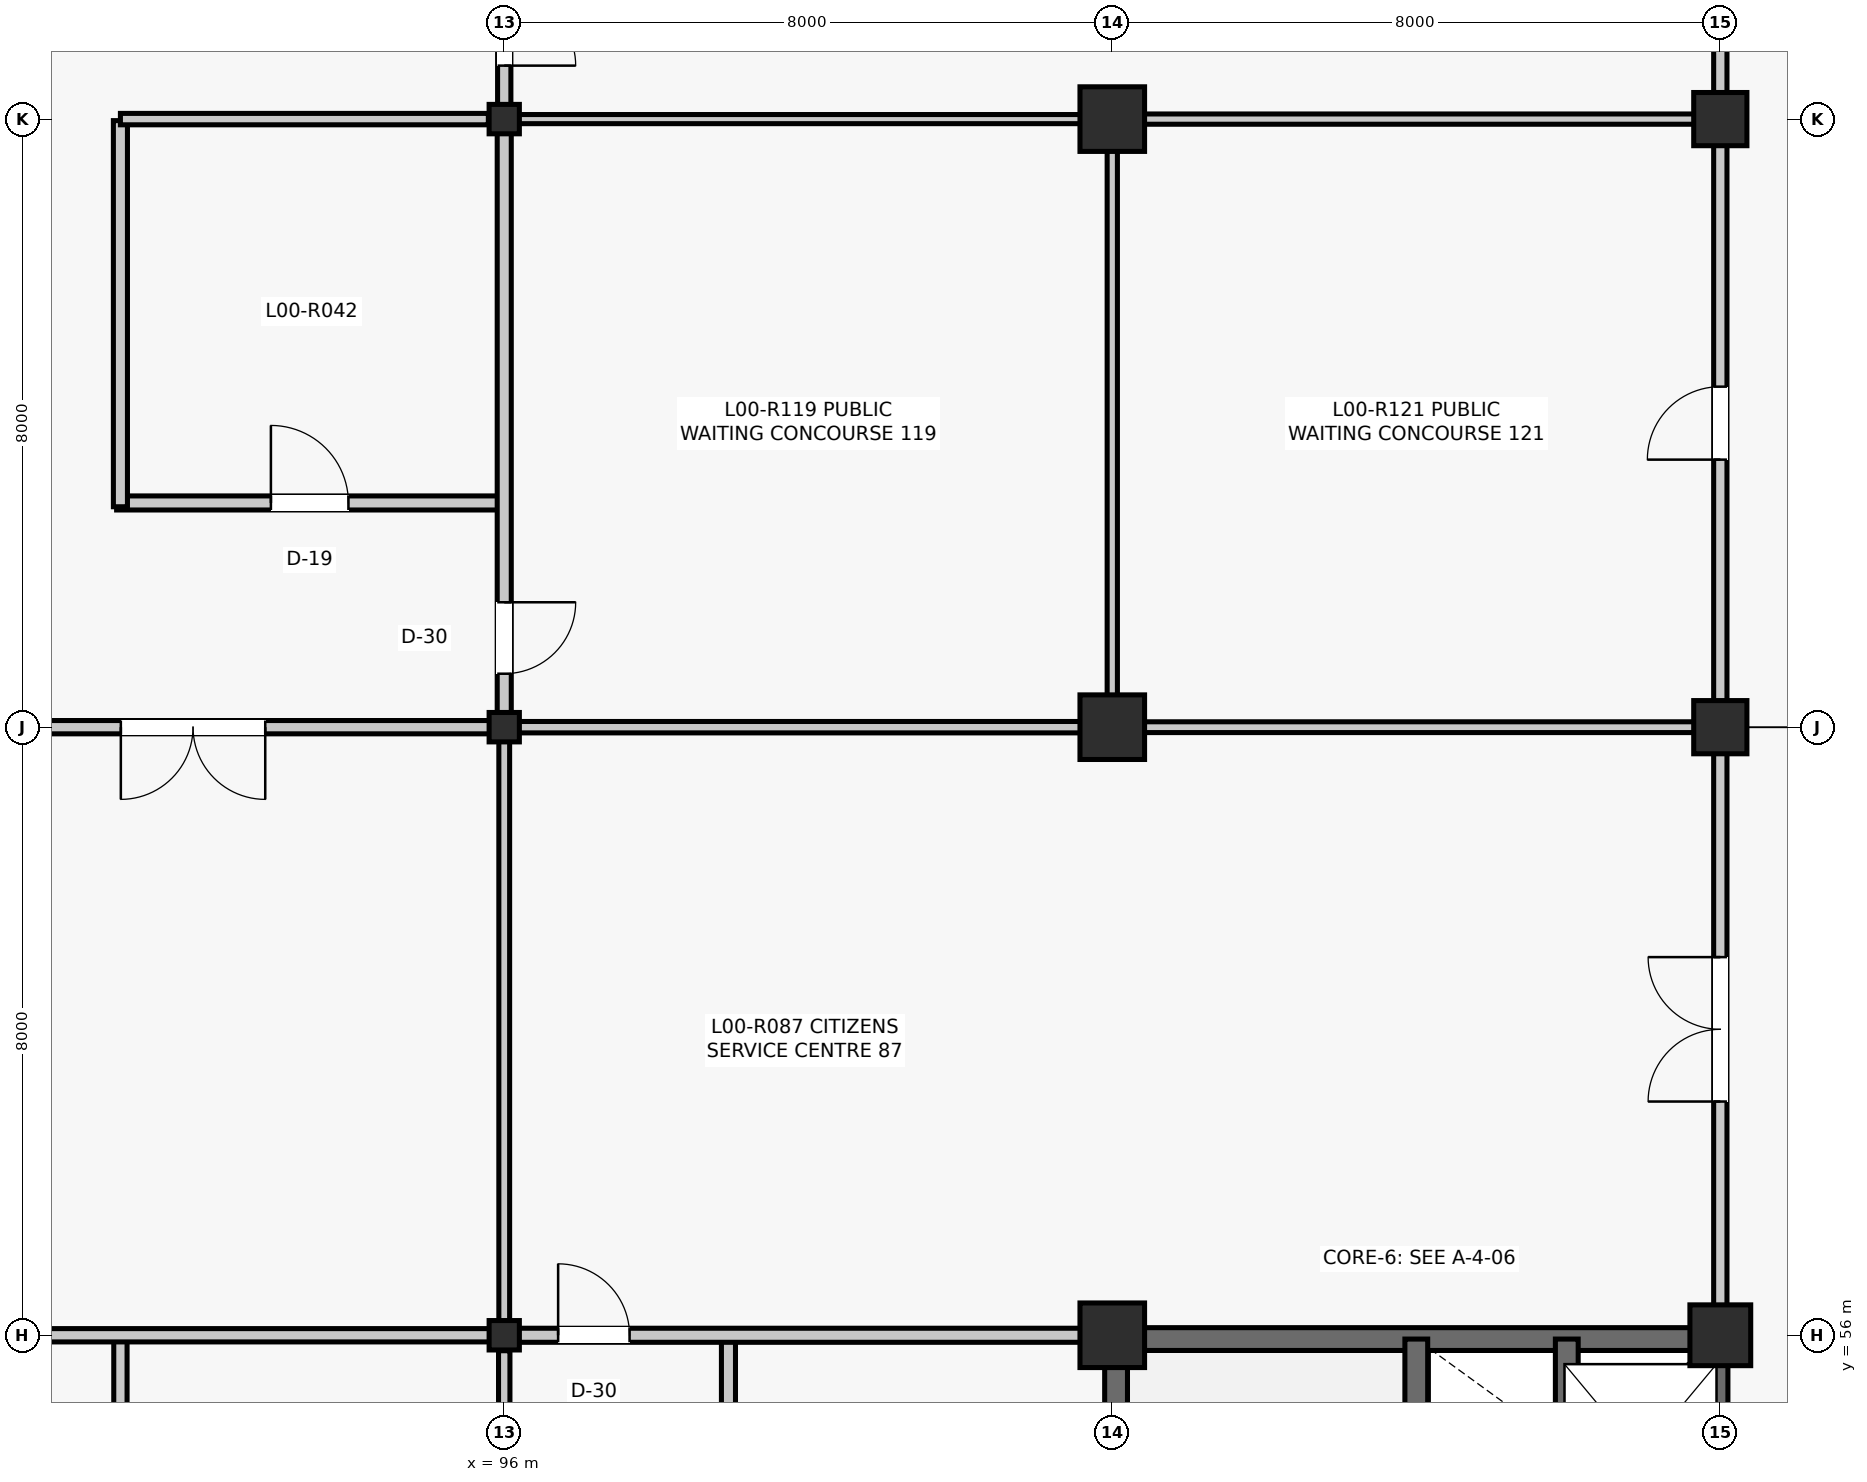
"""IFC4 building model, lengths in metres.
Left out: names, types, materials, properties, quantities, classifications, styles, units other than length and angle.
Written with IfcOpenShell. Run it as: python <this file> out.ifc"""

import sys

from ifc_helpers import new_model, si_unit, direction, frame, frame_2d, origin, origin_2d, place, context, subcontext, project, spatial, rectangle, i_section, extrude, element, fill, save


model = new_model("IFC4")
c1 = context("Model", 3, precision=1e-05, world=origin(), true_north=direction((0.0, 1.0)))
c2 = subcontext(c1, "Body", "Model", "MODEL_VIEW")
j1 = project(units=[si_unit("LENGTHUNIT", "METRE"), si_unit("PLANEANGLEUNIT", "RADIAN")], contexts=[c1])
p1 = place(None, origin())
s1 = spatial("IfcSite", under=j1, at=p1, CompositionType="ELEMENT")
p2 = place(p1, origin())
s2 = spatial("IfcBuilding", under=s1, at=p2, CompositionType="ELEMENT")
p3 = place(p2, origin())
s3 = spatial("IfcBuildingStorey", under=s2, at=p3, CompositionType="ELEMENT", Elevation=0.0)
for number, where, z_axis, x_axis in (
    (1, (96.0, 56.0, 0.0), (0.0, 0.0, 1.0), (1.0, 0.0, 0.0)),
    (2, (96.0, 64.0, 0.0), (0.0, 0.0, 1.0), (1.0, 0.0, 0.0)),
    (3, (96.0, 72.0, 0.0), (0.0, 0.0, 1.0), (1.0, 0.0, 0.0)),
):
    element("IfcColumn", number, at=place(p3, frame(where, z_axis=z_axis, x_axis=x_axis)), inside=s3, PredefinedType="COLUMN", context=c2, shape_type="SweptSolid", body=[
        extrude(i_section(OverallWidth=0.398, OverallDepth=0.387, WebThickness=0.021, FlangeThickness=0.033, FilletRadius=0.015, at=origin_2d()), origin(), (0.0, 0.0, 1.0), 5.28),
    ])
for number, where, z_axis, x_axis in (
    (4, (104.0, 56.0, 0.0), (0.0, 0.0, 1.0), (1.0, 0.0, 0.0)),
    (5, (104.0, 64.0, 0.0), (0.0, 0.0, 1.0), (1.0, 0.0, 0.0)),
    (6, (104.0, 72.0, 0.0), (0.0, 0.0, 1.0), (1.0, 0.0, 0.0)),
):
    element("IfcColumn", number, at=place(p3, frame(where, z_axis=z_axis, x_axis=x_axis)), inside=s3, PredefinedType="COLUMN", context=c2, shape_type="SweptSolid", body=[
        extrude(rectangle(XDim=0.85, YDim=0.85, at=origin_2d()), origin(), (0.0, 0.0, 1.0), 5.28),
    ])
p4 = place(p3, frame((112.0, 56.0, 0.0), z_axis=(0.0, 0.0, 1.0), x_axis=(1.0, 0.0, 0.0)))
e7 = element("IfcColumn", 7, at=p4, inside=s3, PredefinedType="COLUMN", context=c2, shape_type="SweptSolid", body=[
    extrude(rectangle(XDim=0.8, YDim=0.8, at=origin_2d()), origin(), (0.0, 0.0, 1.0), 5.28),
])
for number, where, z_axis, x_axis in (
    (8, (112.0, 64.0, 0.0), (0.0, 0.0, 1.0), (1.0, 0.0, 0.0)),
    (9, (112.0, 72.0, 0.0), (0.0, 0.0, 1.0), (1.0, 0.0, 0.0)),
):
    element("IfcColumn", number, at=place(p3, frame(where, z_axis=z_axis, x_axis=x_axis)), inside=s3, PredefinedType="COLUMN", context=c2, shape_type="SweptSolid", body=[
        extrude(rectangle(XDim=0.7, YDim=0.7, at=origin_2d()), origin(), (0.0, 0.0, 1.0), 5.28),
    ])
p5 = place(p3, frame((104.05, 48.315, 0.0), z_axis=(0.0, 0.0, 1.0), x_axis=(0.0, 1.0, 0.0)))
e10 = element("IfcWall", 10, at=p5, inside=s3, PredefinedType="SHEAR", context=c2, shape_type="SweptSolid", body=[
    extrude(rectangle(XDim=7.37, YDim=0.3, at=frame_2d((3.685, 0.0))), origin(), (0.0, 0.0, 1.0), 5.035),
])
p6 = place(p3, frame((104.315, 55.95, 0.0), z_axis=(0.0, 0.0, 1.0), x_axis=(1.0, 0.0, 0.0)))
e11 = element("IfcWall", 11, at=p6, inside=s3, PredefinedType="SHEAR", context=c2, shape_type="SweptSolid", body=[
    extrude(rectangle(XDim=7.395, YDim=0.3, at=frame_2d((3.698, 0.0))), origin(), (0.0, 0.0, 1.0), 5.035),
])
p7 = place(p3, frame((111.95, 48.29, 0.0), z_axis=(0.0, 0.0, 1.0), x_axis=(0.0, 1.0, 0.0)))
e12 = element("IfcWall", 12, at=p7, inside=s3, PredefinedType="SHEAR", context=c2, shape_type="SweptSolid", body=[
    extrude(rectangle(XDim=7.42, YDim=0.3, at=frame_2d((3.71, 0.0))), origin(), (0.0, 0.0, 1.0), 5.035),
])
p8 = place(p3, frame((108.0, 48.05, 0.0), z_axis=(0.0, 0.0, 1.0), x_axis=(0.0, 1.0, 0.0)))
e13 = element("IfcWall", 13, at=p8, inside=s3, PredefinedType="SHEAR", context=c2, shape_type="SweptSolid", body=[
    extrude(rectangle(XDim=7.9, YDim=0.3, at=frame_2d((3.95, 0.0))), origin(), (0.0, 0.0, 1.0), 5.035),
])
p9 = place(p8, frame((0.55, 0.0, 0.0)))
e14 = element("IfcOpeningElement", 14, at=p9, cuts=e13, PredefinedType="OPENING", context=c2, shape_type="SweptSolid", body=[
    extrude(rectangle(XDim=1.1, YDim=2.15, at=frame_2d((0.55, 1.075))), frame((0.0, 0.16, 0.0), z_axis=(0.0, -1.0, 0.0), x_axis=(1.0, 0.0, 0.0)), (0.0, 0.0, 1.0), 0.32),
])
p10 = place(p3, frame((109.98, 53.05, 0.0), z_axis=(0.0, 0.0, 1.0), x_axis=(0.0, 1.0, 0.0)))
e15 = element("IfcWall", 15, at=p10, inside=s3, PredefinedType="SHEAR", context=c2, shape_type="SweptSolid", body=[
    extrude(rectangle(XDim=2.9, YDim=0.3, at=frame_2d((1.45, 0.0))), origin(), (0.0, 0.0, 1.0), 5.035),
])
p11 = place(p3, frame((90.95, 50.9, 0.0), z_axis=(0.0, 0.0, 1.0), x_axis=(0.0, 1.0, 0.0)))
e16 = element("IfcWall", 16, at=p11, inside=s3, PredefinedType="PARTITIONING", context=c2, shape_type="SweptSolid", body=[
    extrude(rectangle(XDim=5.08, YDim=0.175, at=frame_2d((2.54, 0.0))), origin(), (0.0, 0.0, 1.0), 4.169),
])
p12 = place(p3, frame((96.0, 50.95, 0.0), z_axis=(0.0, 0.0, 1.0), x_axis=(0.0, 1.0, 0.0)))
e17 = element("IfcWall", 17, at=p12, inside=s3, PredefinedType="PARTITIONING", context=c2, shape_type="SweptSolid", body=[
    extrude(rectangle(XDim=4.846, YDim=0.15, at=frame_2d((2.423, 0.0))), origin(), (0.0, 0.0, 1.0), 4.404),
])
p13 = place(p3, frame((90.9, 66.95, 0.0), z_axis=(0.0, 0.0, 1.0), x_axis=(1.0, 0.0, 0.0)))
e18 = element("IfcWall", 18, at=p13, inside=s3, PredefinedType="PARTITIONING", context=c2, shape_type="SweptSolid", body=[
    extrude(rectangle(XDim=5.08, YDim=0.185, at=frame_2d((2.54, 0.0))), origin(), (0.0, 0.0, 1.0), 4.403),
])
p14 = place(p13, frame((2.03, 0.0, 0.0)))
e19 = element("IfcOpeningElement", 19, at=p14, cuts=e18, PredefinedType="OPENING", context=c2, shape_type="SweptSolid", body=[
    extrude(rectangle(XDim=1.02, YDim=2.2, at=frame_2d((0.51, 1.1))), frame((0.0, 0.103, 0.0), z_axis=(0.0, -1.0, 0.0), x_axis=(1.0, 0.0, 0.0)), (0.0, 0.0, 1.0), 0.205),
])
p15 = place(p3, frame((90.95, 66.9, 0.0), z_axis=(0.0, 0.0, 1.0), x_axis=(0.0, 1.0, 0.0)))
e20 = element("IfcWall", 20, at=p15, inside=s3, PredefinedType="PARTITIONING", context=c2, shape_type="SweptSolid", body=[
    extrude(rectangle(XDim=5.08, YDim=0.185, at=frame_2d((2.54, 0.0))), origin(), (0.0, 0.0, 1.0), 4.262),
])
p16 = place(p3, frame((90.95, 72.0, 0.0), z_axis=(0.0, 0.0, 1.0), x_axis=(1.0, 0.0, 0.0)))
e21 = element("IfcWall", 21, at=p16, inside=s3, PredefinedType="PARTITIONING", context=c2, shape_type="SweptSolid", body=[
    extrude(rectangle(XDim=4.841, YDim=0.15, at=frame_2d((2.42, 0.0))), origin(), (0.0, 0.0, 1.0), 4.262),
])
p17 = place(p3, frame((98.95, 50.9, 0.0), z_axis=(0.0, 0.0, 1.0), x_axis=(0.0, 1.0, 0.0)))
e22 = element("IfcWall", 22, at=p17, inside=s3, PredefinedType="PARTITIONING", context=c2, shape_type="SweptSolid", body=[
    extrude(rectangle(XDim=5.08, YDim=0.185, at=frame_2d((2.54, 0.0))), origin(), (0.0, 0.0, 1.0), 4.404),
])
p18 = place(p3, frame((88.0, 56.0, 0.0), z_axis=(0.0, 0.0, 1.0), x_axis=(1.0, 0.0, 0.0)))
e23 = element("IfcWall", 23, at=p18, inside=s3, PredefinedType="PARTITIONING", context=c2, shape_type="SweptSolid", body=[
    extrude(rectangle(XDim=7.811, YDim=0.175, at=frame_2d((3.906, 0.0))), origin(), (0.0, 0.0, 1.0), 4.169),
])
p19 = place(p18, frame((0.52, 0.0, 0.0)))
e24 = element("IfcOpeningElement", 24, at=p19, cuts=e23, PredefinedType="OPENING", context=c2, shape_type="SweptSolid", body=[
    extrude(rectangle(XDim=0.94, YDim=2.12, at=frame_2d((0.47, 1.06))), frame((0.0, 0.097, 0.0), z_axis=(0.0, -1.0, 0.0), x_axis=(1.0, 0.0, 0.0)), (0.0, 0.0, 1.0), 0.195),
])
p20 = place(p3, frame((96.0, 56.184, 0.0), z_axis=(0.0, 0.0, 1.0), x_axis=(0.0, 1.0, 0.0)))
e25 = element("IfcWall", 25, at=p20, inside=s3, PredefinedType="PARTITIONING", context=c2, shape_type="SweptSolid", body=[
    extrude(rectangle(XDim=7.633, YDim=0.142, at=frame_2d((3.816, 0.0))), origin(), (0.0, 0.0, 1.0), 4.471),
])
p21 = place(p3, frame((88.0, 64.0, 0.0), z_axis=(0.0, 0.0, 1.0), x_axis=(1.0, 0.0, 0.0)))
e26 = element("IfcWall", 26, at=p21, inside=s3, PredefinedType="PARTITIONING", context=c2, shape_type="SweptSolid", body=[
    extrude(rectangle(XDim=7.811, YDim=0.175, at=frame_2d((3.906, 0.0))), origin(), (0.0, 0.0, 1.0), 4.25),
])
p22 = place(p21, frame((2.956, 0.0, 0.0)))
e27 = element("IfcOpeningElement", 27, at=p22, cuts=e26, PredefinedType="OPENING", context=c2, shape_type="SweptSolid", body=[
    extrude(rectangle(XDim=1.9, YDim=2.38, at=frame_2d((0.95, 1.19))), frame((0.0, 0.097, 0.0), z_axis=(0.0, -1.0, 0.0), x_axis=(1.0, 0.0, 0.0)), (0.0, 0.0, 1.0), 0.195),
])
p23 = place(p3, frame((96.0, 64.184, 0.0), z_axis=(0.0, 0.0, 1.0), x_axis=(0.0, 1.0, 0.0)))
e28 = element("IfcWall", 28, at=p23, inside=s3, PredefinedType="PARTITIONING", context=c2, shape_type="SweptSolid", body=[
    extrude(rectangle(XDim=7.633, YDim=0.185, at=frame_2d((3.816, 0.0))), origin(), (0.0, 0.0, 1.0), 4.403),
])
p24 = place(p23, frame((0.52, 0.0, 0.0)))
e29 = element("IfcOpeningElement", 29, at=p24, cuts=e28, PredefinedType="OPENING", context=c2, shape_type="SweptSolid", body=[
    extrude(rectangle(XDim=0.94, YDim=2.12, at=frame_2d((0.47, 1.06))), frame((0.0, 0.103, 0.0), z_axis=(0.0, -1.0, 0.0), x_axis=(1.0, 0.0, 0.0)), (0.0, 0.0, 1.0), 0.205),
])
p25 = place(p3, frame((96.0, 72.184, 0.0), z_axis=(0.0, 0.0, 1.0), x_axis=(0.0, 1.0, 0.0)))
e30 = element("IfcWall", 30, at=p25, inside=s3, PredefinedType="PARTITIONING", context=c2, shape_type="SweptSolid", body=[
    extrude(rectangle(XDim=7.633, YDim=0.175, at=frame_2d((3.816, 0.0))), origin(), (0.0, 0.0, 1.0), 4.412),
])
p26 = place(p25, frame((0.52, 0.0, 0.0)))
e31 = element("IfcOpeningElement", 31, at=p26, cuts=e30, PredefinedType="OPENING", context=c2, shape_type="SweptSolid", body=[
    extrude(rectangle(XDim=0.94, YDim=2.12, at=frame_2d((0.47, 1.06))), frame((0.0, 0.097, 0.0), z_axis=(0.0, -1.0, 0.0), x_axis=(1.0, 0.0, 0.0)), (0.0, 0.0, 1.0), 0.195),
])
p27 = place(p3, frame((96.189, 56.0, 0.0), z_axis=(0.0, 0.0, 1.0), x_axis=(1.0, 0.0, 0.0)))
e32 = element("IfcWall", 32, at=p27, inside=s3, PredefinedType="PARTITIONING", context=c2, shape_type="SweptSolid", body=[
    extrude(rectangle(XDim=7.396, YDim=0.185, at=frame_2d((3.698, 0.0))), origin(), (0.0, 0.0, 1.0), 4.404),
])
p28 = place(p27, frame((0.52, 0.0, 0.0)))
e33 = element("IfcOpeningElement", 33, at=p28, cuts=e32, PredefinedType="OPENING", context=c2, shape_type="SweptSolid", body=[
    extrude(rectangle(XDim=0.94, YDim=2.12, at=frame_2d((0.47, 1.06))), frame((0.0, 0.103, 0.0), z_axis=(0.0, -1.0, 0.0), x_axis=(1.0, 0.0, 0.0)), (0.0, 0.0, 1.0), 0.205),
])
p29 = place(p3, frame((96.189, 64.0, 0.0), z_axis=(0.0, 0.0, 1.0), x_axis=(1.0, 0.0, 0.0)))
e34 = element("IfcWall", 34, at=p29, inside=s3, PredefinedType="PARTITIONING", context=c2, shape_type="SweptSolid", body=[
    extrude(rectangle(XDim=7.396, YDim=0.15, at=frame_2d((3.698, 0.0))), origin(), (0.0, 0.0, 1.0), 4.327),
])
p30 = place(p3, frame((104.0, 64.415, 0.0), z_axis=(0.0, 0.0, 1.0), x_axis=(0.0, 1.0, 0.0)))
e35 = element("IfcWall", 35, at=p30, inside=s3, PredefinedType="PARTITIONING", context=c2, shape_type="SweptSolid", body=[
    extrude(rectangle(XDim=7.17, YDim=0.135, at=frame_2d((3.585, 0.0))), origin(), (0.0, 0.0, 1.0), 4.412),
])
p31 = place(p3, frame((96.189, 72.0, 0.0), z_axis=(0.0, 0.0, 1.0), x_axis=(1.0, 0.0, 0.0)))
e36 = element("IfcWall", 36, at=p31, inside=s3, PredefinedType="PARTITIONING", context=c2, shape_type="SweptSolid", body=[
    extrude(rectangle(XDim=7.396, YDim=0.12, at=frame_2d((3.698, 0.0))), origin(), (0.0, 0.0, 1.0), 4.403),
])
p32 = place(p3, frame((112.0, 56.39, 0.0), z_axis=(0.0, 0.0, 1.0), x_axis=(0.0, 1.0, 0.0)))
e37 = element("IfcWall", 37, at=p32, inside=s3, PredefinedType="PARTITIONING", context=c2, shape_type="SweptSolid", body=[
    extrude(rectangle(XDim=7.27, YDim=0.175, at=frame_2d((3.635, 0.0))), origin(), (0.0, 0.0, 1.0), 4.412),
])
p33 = place(p32, frame((2.685, 0.0, 0.0)))
e38 = element("IfcOpeningElement", 38, at=p33, cuts=e37, PredefinedType="OPENING", context=c2, shape_type="SweptSolid", body=[
    extrude(rectangle(XDim=1.9, YDim=2.38, at=frame_2d((0.95, 1.19))), frame((0.0, 0.097, 0.0), z_axis=(0.0, -1.0, 0.0), x_axis=(1.0, 0.0, 0.0)), (0.0, 0.0, 1.0), 0.195),
])
p34 = place(p3, frame((104.415, 64.0, 0.0), z_axis=(0.0, 0.0, 1.0), x_axis=(1.0, 0.0, 0.0)))
e39 = element("IfcWall", 39, at=p34, inside=s3, PredefinedType="PARTITIONING", context=c2, shape_type="SweptSolid", body=[
    extrude(rectangle(XDim=7.245, YDim=0.142, at=frame_2d((3.623, 0.0))), origin(), (0.0, 0.0, 1.0), 4.403),
])
p35 = place(p3, frame((112.0, 64.34, 0.0), z_axis=(0.0, 0.0, 1.0), x_axis=(0.0, 1.0, 0.0)))
e40 = element("IfcWall", 40, at=p35, inside=s3, PredefinedType="PARTITIONING", context=c2, shape_type="SweptSolid", body=[
    extrude(rectangle(XDim=7.32, YDim=0.175, at=frame_2d((3.66, 0.0))), origin(), (0.0, 0.0, 1.0), 4.404),
])
p36 = place(p35, frame((3.18, 0.0, 0.0)))
e41 = element("IfcOpeningElement", 41, at=p36, cuts=e40, PredefinedType="OPENING", context=c2, shape_type="SweptSolid", body=[
    extrude(rectangle(XDim=0.96, YDim=2.14, at=frame_2d((0.48, 1.07))), frame((0.0, 0.097, 0.0), z_axis=(0.0, -1.0, 0.0), x_axis=(1.0, 0.0, 0.0)), (0.0, 0.0, 1.0), 0.195),
])
p37 = place(p3, frame((104.415, 72.0, 0.0), z_axis=(0.0, 0.0, 1.0), x_axis=(1.0, 0.0, 0.0)))
e42 = element("IfcWall", 42, at=p37, inside=s3, PredefinedType="PARTITIONING", context=c2, shape_type="SweptSolid", body=[
    extrude(rectangle(XDim=7.245, YDim=0.135, at=frame_2d((3.623, 0.0))), origin(), (0.0, 0.0, 1.0), 4.336),
])
p38 = place(p3, frame((112.0, 72.34, 0.0), z_axis=(0.0, 0.0, 1.0), x_axis=(0.0, 1.0, 0.0)))
e43 = element("IfcWall", 43, at=p38, inside=s3, PredefinedType="PARTITIONING", context=c2, shape_type="SweptSolid", body=[
    extrude(rectangle(XDim=7.32, YDim=0.175, at=frame_2d((3.66, 0.0))), origin(), (0.0, 0.0, 1.0), 4.471),
])
p39 = place(p38, frame((2.71, 0.0, 0.0)))
e44 = element("IfcOpeningElement", 44, at=p39, cuts=e43, PredefinedType="OPENING", context=c2, shape_type="SweptSolid", body=[
    extrude(rectangle(XDim=1.9, YDim=2.38, at=frame_2d((0.95, 1.19))), frame((0.0, 0.097, 0.0), z_axis=(0.0, -1.0, 0.0), x_axis=(1.0, 0.0, 0.0)), (0.0, 0.0, 1.0), 0.195),
])
p40 = place(p14, origin())
e45 = element("IfcDoor", 45, at=p40, inside=s3, OperationType="SINGLE_SWING_LEFT", PredefinedType="DOOR", context=c2, shape_type="SweptSolid", body=[
    extrude(rectangle(XDim=1.02, YDim=2.2, at=frame_2d((0.51, 1.1))), frame((0.0, 0.025, 0.0), z_axis=(0.0, -1.0, 0.0), x_axis=(1.0, 0.0, 0.0)), (0.0, 0.0, 1.0), 0.05),
])
fill(e19, e45)
p41 = place(p22, frame((1.9, 0.0, 0.0), z_axis=(0.0, 0.0, 1.0), x_axis=(-1.0, 0.0, 0.0)))
e46 = element("IfcDoor", 46, at=p41, inside=s3, OperationType="DOUBLE_DOOR_SINGLE_SWING", PredefinedType="DOOR", context=c2, shape_type="SweptSolid", body=[
    extrude(rectangle(XDim=1.9, YDim=2.38, at=frame_2d((0.95, 1.19))), frame((0.0, 0.025, 0.0), z_axis=(0.0, -1.0, 0.0), x_axis=(1.0, 0.0, 0.0)), (0.0, 0.0, 1.0), 0.05),
])
fill(e27, e46)
p42 = place(p24, frame((0.94, 0.0, 0.0), z_axis=(0.0, 0.0, 1.0), x_axis=(-1.0, 0.0, 0.0)))
e47 = element("IfcDoor", 47, at=p42, inside=s3, OperationType="SINGLE_SWING_RIGHT", PredefinedType="DOOR", context=c2, shape_type="SweptSolid", body=[
    extrude(rectangle(XDim=0.94, YDim=2.12, at=frame_2d((0.47, 1.06))), frame((0.0, 0.025, 0.0), z_axis=(0.0, -1.0, 0.0), x_axis=(1.0, 0.0, 0.0)), (0.0, 0.0, 1.0), 0.05),
])
fill(e29, e47)
p43 = place(p26, frame((0.94, 0.0, 0.0), z_axis=(0.0, 0.0, 1.0), x_axis=(-1.0, 0.0, 0.0)))
e48 = element("IfcDoor", 48, at=p43, inside=s3, OperationType="SINGLE_SWING_LEFT", PredefinedType="DOOR", context=c2, shape_type="SweptSolid", body=[
    extrude(rectangle(XDim=0.94, YDim=2.12, at=frame_2d((0.47, 1.06))), frame((0.0, 0.025, 0.0), z_axis=(0.0, -1.0, 0.0), x_axis=(1.0, 0.0, 0.0)), (0.0, 0.0, 1.0), 0.05),
])
fill(e31, e48)
p44 = place(p28, origin())
e49 = element("IfcDoor", 49, at=p44, inside=s3, OperationType="SINGLE_SWING_LEFT", PredefinedType="DOOR", context=c2, shape_type="SweptSolid", body=[
    extrude(rectangle(XDim=0.94, YDim=2.12, at=frame_2d((0.47, 1.06))), frame((0.0, 0.025, 0.0), z_axis=(0.0, -1.0, 0.0), x_axis=(1.0, 0.0, 0.0)), (0.0, 0.0, 1.0), 0.05),
])
fill(e33, e49)
p45 = place(p33, origin())
e50 = element("IfcDoor", 50, at=p45, inside=s3, OperationType="DOUBLE_DOOR_SINGLE_SWING", PredefinedType="DOOR", context=c2, shape_type="SweptSolid", body=[
    extrude(rectangle(XDim=1.9, YDim=2.38, at=frame_2d((0.95, 1.19))), frame((0.0, 0.025, 0.0), z_axis=(0.0, -1.0, 0.0), x_axis=(1.0, 0.0, 0.0)), (0.0, 0.0, 1.0), 0.05),
])
fill(e38, e50)
p46 = place(p36, origin())
e51 = element("IfcDoor", 51, at=p46, inside=s3, OperationType="SINGLE_SWING_LEFT", PredefinedType="DOOR", context=c2, shape_type="SweptSolid", body=[
    extrude(rectangle(XDim=0.96, YDim=2.14, at=frame_2d((0.48, 1.07))), frame((0.0, 0.025, 0.0), z_axis=(0.0, -1.0, 0.0), x_axis=(1.0, 0.0, 0.0)), (0.0, 0.0, 1.0), 0.05),
])
fill(e41, e51)
save(model, sys.argv[1])
